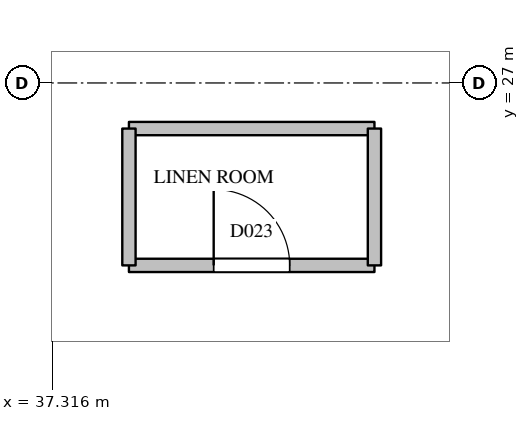
"""IFC4 building model, lengths in metres.
Left out: names, types, materials, properties, quantities, classifications, styles, units other than length and angle.
Written with IfcOpenShell. Run it as: python <this file> out.ifc"""

import sys

from ifc_helpers import new_model, si_unit, direction, frame, frame_2d, origin, place, context, subcontext, project, spatial, rectangle, extrude, element, fill, save


model = new_model("IFC4")
c1 = context("Model", 3, precision=1e-05, world=origin(), true_north=direction((0.0, 1.0)))
c2 = subcontext(c1, "Body", "Model", "MODEL_VIEW")
j1 = project(units=[si_unit("LENGTHUNIT", "METRE"), si_unit("PLANEANGLEUNIT", "RADIAN")], contexts=[c1])
p1 = place(None, origin())
s1 = spatial("IfcSite", under=j1, at=p1, CompositionType="ELEMENT")
p2 = place(p1, origin())
s2 = spatial("IfcBuilding", under=s1, at=p2, CompositionType="ELEMENT")
p3 = place(p2, frame((0.0, 0.0, 53.8)))
s3 = spatial("IfcBuildingStorey", under=s2, at=p3, CompositionType="ELEMENT", Elevation=53.8)
p4 = place(p3, frame((38.32, 24.6, 0.0), z_axis=(0.0, 0.0, 1.0), x_axis=(1.0, 0.0, 0.0)))
e1 = element("IfcWall", 1, at=p4, inside=s3, PredefinedType="PARTITIONING", context=c2, shape_type="SweptSolid", body=[
    extrude(rectangle(XDim=3.23, YDim=0.175, at=frame_2d((1.615, 0.0))), origin(), (0.0, 0.0, 1.0), 3.5),
])
p5 = place(p4, frame((1.115, 0.0, 0.0)))
e2 = element("IfcOpeningElement", 2, at=p5, cuts=e1, PredefinedType="OPENING", context=c2, shape_type="SweptSolid", body=[
    extrude(rectangle(XDim=1.0, YDim=2.1, at=frame_2d((0.5, 1.05))), frame((0.0, 0.097, 0.0), z_axis=(0.0, -1.0, 0.0), x_axis=(1.0, 0.0, 0.0)), (0.0, 0.0, 1.0), 0.195),
])
p6 = place(p3, frame((38.32, 26.4, 0.0), z_axis=(0.0, 0.0, 1.0), x_axis=(1.0, 0.0, 0.0)))
e3 = element("IfcWall", 3, at=p6, inside=s3, PredefinedType="PARTITIONING", context=c2, shape_type="SweptSolid", body=[
    extrude(rectangle(XDim=3.23, YDim=0.175, at=frame_2d((1.615, 0.0))), origin(), (0.0, 0.0, 1.0), 3.5),
])
for number, where, z_axis, x_axis in (
    (4, (38.32, 24.6, 0.0), (0.0, 0.0, 1.0), (0.0, 1.0, 0.0)),
    (5, (41.55, 24.6, 0.0), (0.0, 0.0, 1.0), (0.0, 1.0, 0.0)),
):
    element("IfcWall", number, at=place(p3, frame(where, z_axis=z_axis, x_axis=x_axis)), inside=s3, PredefinedType="PARTITIONING", context=c2, shape_type="SweptSolid", body=[
        extrude(rectangle(XDim=1.8, YDim=0.175, at=frame_2d((0.9, 0.0))), origin(), (0.0, 0.0, 1.0), 3.5),
    ])
p7 = place(p5, origin())
e6 = element("IfcDoor", 6, at=p7, inside=s3, OperationType="SINGLE_SWING_LEFT", PredefinedType="DOOR", context=c2, shape_type="SweptSolid", body=[
    extrude(rectangle(XDim=1.0, YDim=2.1, at=frame_2d((0.5, 1.05))), frame((0.0, 0.025, 0.0), z_axis=(0.0, -1.0, 0.0), x_axis=(1.0, 0.0, 0.0)), (0.0, 0.0, 1.0), 0.05),
])
fill(e2, e6)
save(model, sys.argv[1])
